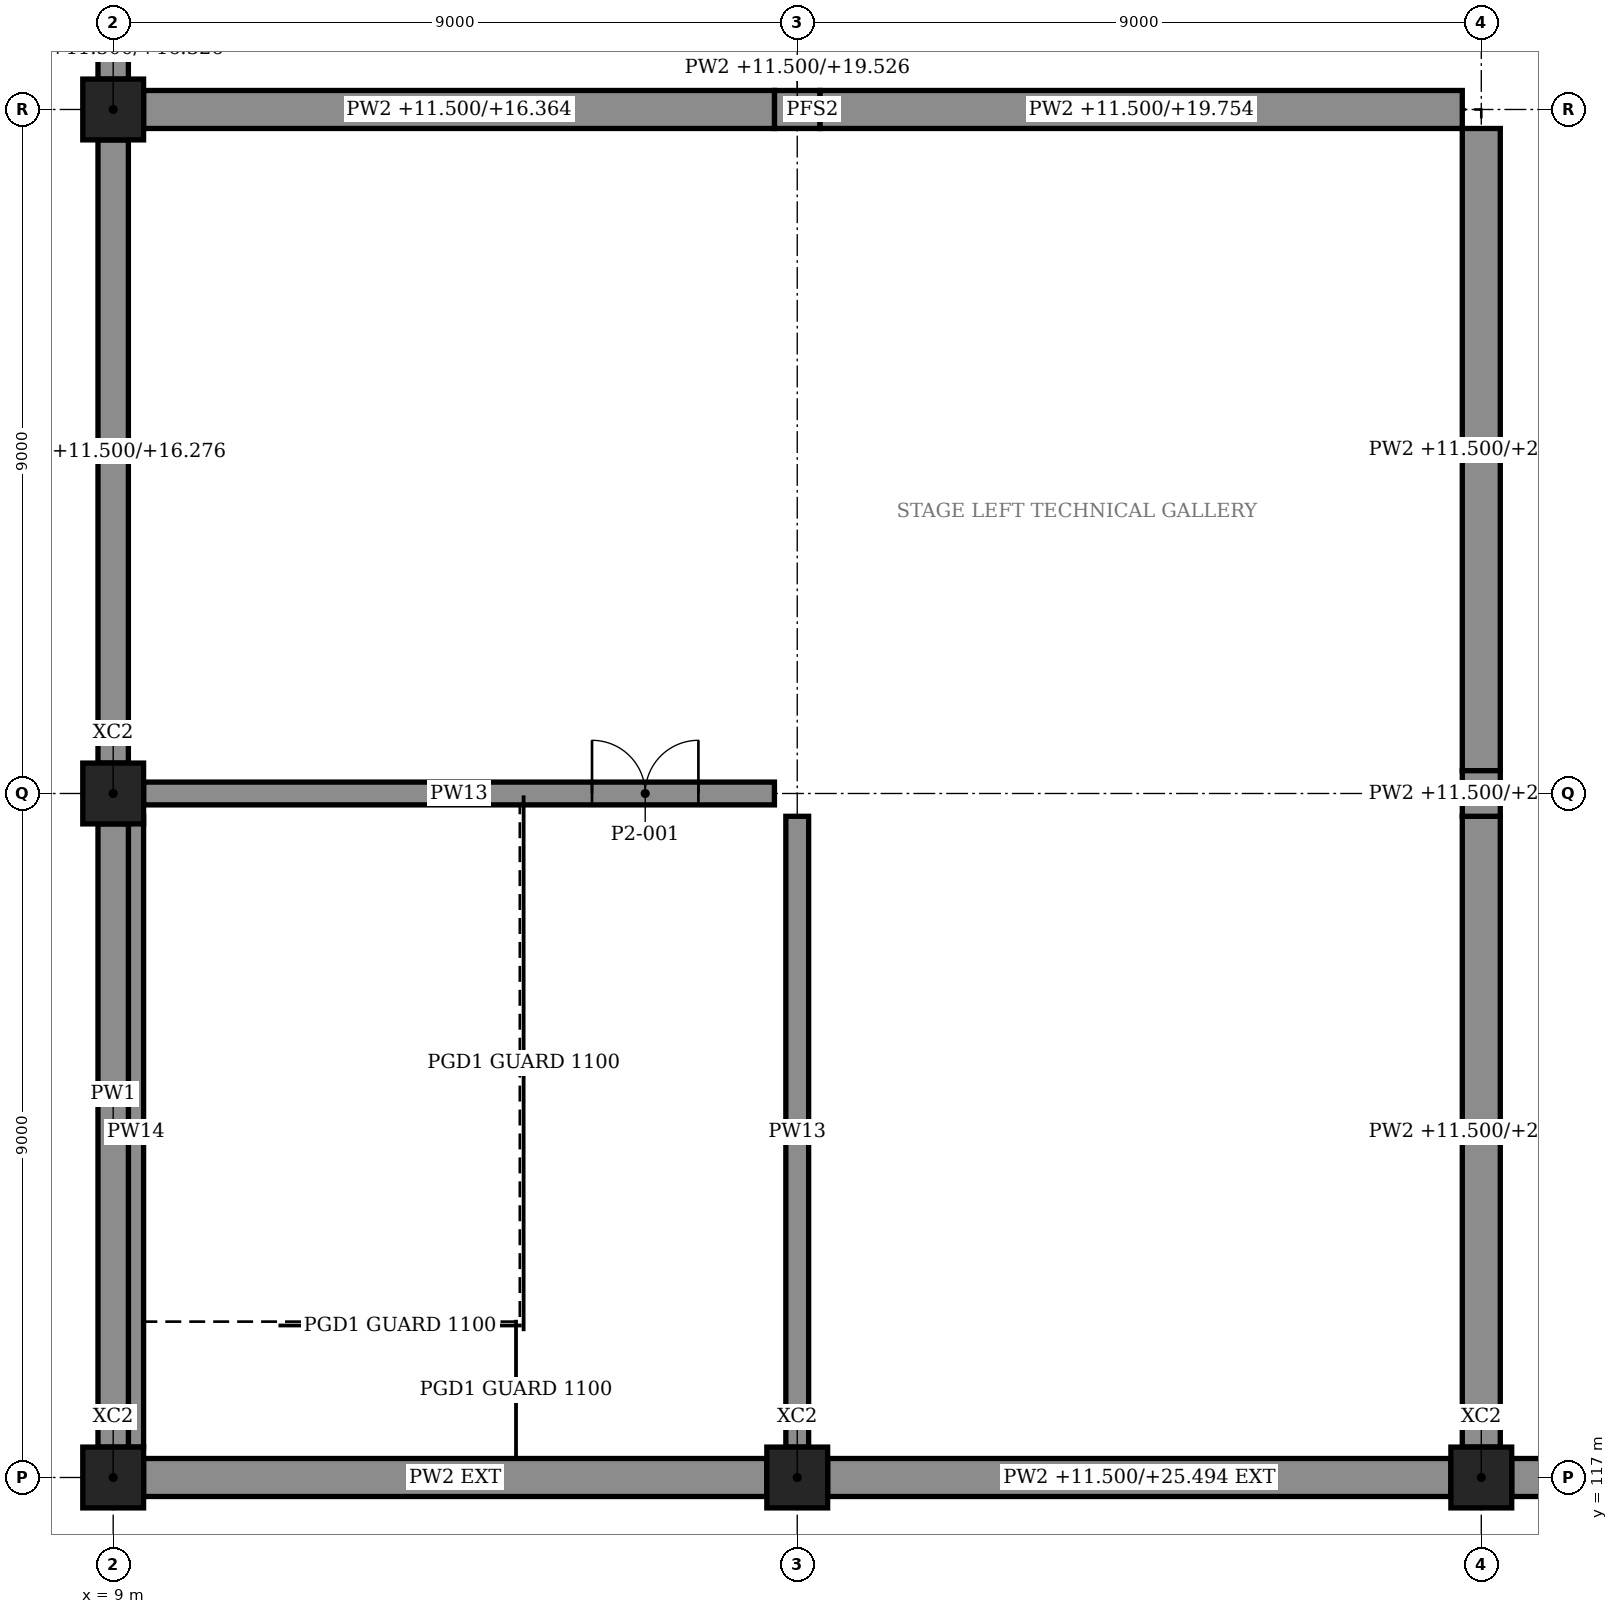
"""IFC4 building model, lengths in metres.
Left out: names, types, materials, properties, quantities, classifications, styles, units other than length and angle.
Written with IfcOpenShell. Run it as: python <this file> out.ifc"""

import sys

from ifc_helpers import new_model, si_unit, direction, frame, frame_2d, origin, origin_2d, place, context, subcontext, project, spatial, polyline, rectangle, outline, extrude, element, fill, save


model = new_model("IFC4")
c1 = context("Model", 3, precision=1e-05, world=origin(), true_north=direction((0.0, 1.0)))
c2 = subcontext(c1, "Body", "Model", "MODEL_VIEW")
j1 = project(units=[si_unit("LENGTHUNIT", "METRE"), si_unit("PLANEANGLEUNIT", "RADIAN")], contexts=[c1])
p1 = place(None, origin())
s1 = spatial("IfcSite", under=j1, at=p1, CompositionType="ELEMENT")
p2 = place(p1, origin())
s2 = spatial("IfcBuilding", under=s1, at=p2, CompositionType="ELEMENT")
p3 = place(p2, frame((0.0, 0.0, 11.5)))
s3 = spatial("IfcBuildingStorey", under=s2, at=p3, CompositionType="ELEMENT", Elevation=11.5)
for number, where, z_axis, x_axis in (
    (1, (9.0, 117.0, 0.0), (0.0, 0.0, 1.0), (1.0, 0.0, 0.0)),
    (2, (18.0, 117.0, 0.0), (0.0, 0.0, 1.0), (1.0, 0.0, 0.0)),
    (3, (27.0, 117.0, 0.0), (0.0, 0.0, 1.0), (1.0, 0.0, 0.0)),
    (4, (9.0, 126.0, 0.0), (0.0, 0.0, 1.0), (1.0, 0.0, 0.0)),
):
    element("IfcColumn", number, at=place(p3, frame(where, z_axis=z_axis, x_axis=x_axis)), inside=s3, PredefinedType="COLUMN", context=c2, shape_type="SweptSolid", body=[
        extrude(rectangle(XDim=0.8, YDim=0.8, at=origin_2d()), origin(), (0.0, 0.0, 1.0), 5.5),
    ])
p4 = place(p3, frame((9.0, 135.0, 0.0), z_axis=(0.0, 0.0, 1.0), x_axis=(1.0, 0.0, 0.0)))
e5 = element("IfcColumn", 5, at=p4, inside=s3, PredefinedType="COLUMN", context=c2, shape_type="SweptSolid", body=[
    extrude(rectangle(XDim=0.8, YDim=0.8, at=origin_2d()), origin(), (0.0, 0.0, 1.0), 4.826),
])
p5 = place(p3, frame((9.0, 117.4, 0.0), z_axis=(0.0, 0.0, 1.0), x_axis=(0.0, 1.0, 0.0)))
e6 = element("IfcWall", 6, at=p5, inside=s3, PredefinedType="SOLIDWALL", context=c2, shape_type="SweptSolid", body=[
    extrude(outline(polyline([(0.0, 0.0), (8.2, 0.0), (8.2, 7.061), (0.0, 10.313), (0.0, 0.0)])), frame((0.0, 0.2, 0.0), z_axis=(0.0, -1.0, 0.0), x_axis=(1.0, 0.0, 0.0)), (0.0, 0.0, 1.0), 0.4),
])
p6 = place(p3, frame((9.0, 126.4, 0.0), z_axis=(0.0, 0.0, 1.0), x_axis=(0.0, 1.0, 0.0)))
e7 = element("IfcWall", 7, at=p6, inside=s3, PredefinedType="SOLIDWALL", context=c2, shape_type="SweptSolid", body=[
    extrude(outline(polyline([(0.0, 0.0), (8.2, 0.0), (8.2, 4.776), (0.0, 6.936), (0.0, 0.0)])), frame((0.0, 0.2, 0.0), z_axis=(0.0, -1.0, 0.0), x_axis=(1.0, 0.0, 0.0)), (0.0, 0.0, 1.0), 0.4),
])
p7 = place(p3, frame((9.0, 135.4, 0.0), z_axis=(0.0, 0.0, 1.0), x_axis=(0.0, 1.0, 0.0)))
e8 = element("IfcWall", 8, at=p7, inside=s3, PredefinedType="SOLIDWALL", context=c2, shape_type="SweptSolid", body=[
    extrude(outline(polyline([(0.0, 0.0), (8.2, 0.0), (8.2, 3.633), (0.0, 4.701), (0.0, 0.0)])), frame((0.0, 0.2, 0.0), z_axis=(0.0, -1.0, 0.0), x_axis=(1.0, 0.0, 0.0)), (0.0, 0.0, 1.0), 0.4),
])
p8 = place(p3, frame((9.4, 117.0, 0.0), z_axis=(0.0, 0.0, 1.0), x_axis=(1.0, 0.0, 0.0)))
e9 = element("IfcWall", 9, at=p8, inside=s3, PredefinedType="SOLIDWALL", context=c2, shape_type="SweptSolid", body=[
    extrude(outline(polyline([(0.0, 0.0), (8.2, 0.0), (8.2, 13.816), (0.0, 10.578), (0.0, 0.0)])), frame((0.0, 0.25, 0.0), z_axis=(0.0, -1.0, 0.0), x_axis=(1.0, 0.0, 0.0)), (0.0, 0.0, 1.0), 0.5),
])
p9 = place(p3, frame((18.4, 117.0, 0.0), z_axis=(0.0, 0.0, 1.0), x_axis=(1.0, 0.0, 0.0)))
e10 = element("IfcWall", 10, at=p9, inside=s3, PredefinedType="SOLIDWALL", context=c2, shape_type="SweptSolid", body=[
    extrude(outline(polyline([(0.0, 0.0), (8.2, 0.0), (8.2, 16.153), (0.0, 13.994), (0.0, 0.0)])), frame((0.0, 0.25, 0.0), z_axis=(0.0, -1.0, 0.0), x_axis=(1.0, 0.0, 0.0)), (0.0, 0.0, 1.0), 0.5),
])
p10 = place(p3, frame((27.4, 117.0, 0.0), z_axis=(0.0, 0.0, 1.0), x_axis=(1.0, 0.0, 0.0)))
e11 = element("IfcWall", 11, at=p10, inside=s3, PredefinedType="SOLIDWALL", context=c2, shape_type="SweptSolid", body=[
    extrude(outline(polyline([(0.0, 0.0), (8.2, 0.0), (8.2, 17.346), (0.0, 16.267), (0.0, 0.0)])), frame((0.0, 0.25, 0.0), z_axis=(0.0, -1.0, 0.0), x_axis=(1.0, 0.0, 0.0)), (0.0, 0.0, 1.0), 0.5),
])
p11 = place(p3, frame((9.4, 135.0, 0.0), z_axis=(0.0, 0.0, 1.0), x_axis=(1.0, 0.0, 0.0)))
e12 = element("IfcWall", 12, at=p11, inside=s3, PredefinedType="SOLIDWALL", context=c2, shape_type="SweptSolid", body=[
    extrude(outline(polyline([(0.0, 0.0), (8.3, 0.0), (8.3, 8.14), (0.0, 4.864), (0.0, 0.0)])), frame((0.0, 0.25, 0.0), z_axis=(0.0, -1.0, 0.0), x_axis=(1.0, 0.0, 0.0)), (0.0, 0.0, 1.0), 0.5),
])
p12 = place(p3, frame((18.3, 135.0, 0.0), z_axis=(0.0, 0.0, 1.0), x_axis=(1.0, 0.0, 0.0)))
e13 = element("IfcWall", 13, at=p12, inside=s3, PredefinedType="SOLIDWALL", context=c2, shape_type="SweptSolid", body=[
    extrude(outline(polyline([(0.0, 0.0), (8.45, 0.0), (8.45, 10.477), (0.0, 8.254), (0.0, 0.0)])), frame((0.0, 0.25, 0.0), z_axis=(0.0, -1.0, 0.0), x_axis=(1.0, 0.0, 0.0)), (0.0, 0.0, 1.0), 0.5),
])
p13 = place(p3, frame((27.0, 117.4, 0.0), z_axis=(0.0, 0.0, 1.0), x_axis=(0.0, 1.0, 0.0)))
e14 = element("IfcWall", 14, at=p13, inside=s3, PredefinedType="SOLIDWALL", context=c2, shape_type="SweptSolid", body=[
    extrude(outline(polyline([(0.0, 0.0), (8.3, 0.0), (8.3, 12.922), (0.0, 16.078), (0.0, 0.0)])), frame((0.0, 0.25, 0.0), z_axis=(0.0, -1.0, 0.0), x_axis=(1.0, 0.0, 0.0)), (0.0, 0.0, 1.0), 0.5),
])
p14 = place(p3, frame((27.0, 126.3, 0.0), z_axis=(0.0, 0.0, 1.0), x_axis=(0.0, 1.0, 0.0)))
e15 = element("IfcWall", 15, at=p14, inside=s3, PredefinedType="SOLIDWALL", context=c2, shape_type="SweptSolid", body=[
    extrude(outline(polyline([(0.0, 0.0), (8.45, 0.0), (8.45, 10.588), (0.0, 12.731), (0.0, 0.0)])), frame((0.0, 0.25, 0.0), z_axis=(0.0, -1.0, 0.0), x_axis=(1.0, 0.0, 0.0)), (0.0, 0.0, 1.0), 0.5),
])
p15 = place(p3, frame((27.0, 125.7, 0.0), z_axis=(0.0, 0.0, 1.0), x_axis=(0.0, 1.0, 0.0)))
e16 = element("IfcWall", 16, at=p15, inside=s3, PredefinedType="SOLIDWALL", context=c2, shape_type="SweptSolid", body=[
    extrude(outline(polyline([(0.0, 0.0), (0.6, 0.0), (0.6, 12.731), (0.0, 12.922), (0.0, 0.0)])), frame((0.0, 0.25, 0.0), z_axis=(0.0, -1.0, 0.0), x_axis=(1.0, 0.0, 0.0)), (0.0, 0.0, 1.0), 0.5),
])
p16 = place(p3, frame((17.7, 135.0, 0.0), z_axis=(0.0, 0.0, 1.0), x_axis=(1.0, 0.0, 0.0)))
e17 = element("IfcWall", 17, at=p16, inside=s3, PredefinedType="SOLIDWALL", context=c2, shape_type="SweptSolid", body=[
    extrude(outline(polyline([(0.0, 0.0), (0.6, 0.0), (0.6, 8.331), (0.3, 8.254), (0.0, 8.026), (0.0, 0.0)])), frame((0.0, 0.25, 0.0), z_axis=(0.0, -1.0, 0.0), x_axis=(1.0, 0.0, 0.0)), (0.0, 0.0, 1.0), 0.5),
])
p17 = place(p3, frame((18.0, 117.4, 0.0), z_axis=(0.0, 0.0, 1.0), x_axis=(0.0, 1.0, 0.0)))
e18 = element("IfcWall", 18, at=p17, inside=s3, PredefinedType="SOLIDWALL", context=c2, shape_type="SweptSolid", body=[
    extrude(rectangle(XDim=8.3, YDim=0.3, at=frame_2d((4.15, 0.0))), origin(), (0.0, 0.0, 1.0), 2.5),
])
p18 = place(p3, frame((9.4, 126.0, 0.0), z_axis=(0.0, 0.0, 1.0), x_axis=(1.0, 0.0, 0.0)))
e19 = element("IfcWall", 19, at=p18, inside=s3, PredefinedType="SOLIDWALL", context=c2, shape_type="SweptSolid", body=[
    extrude(rectangle(XDim=8.3, YDim=0.3, at=frame_2d((4.15, 0.0))), origin(), (0.0, 0.0, 1.0), 2.5),
])
p19 = place(p18, frame((5.9, 0.0, 0.0)))
e20 = element("IfcOpeningElement", 20, at=p19, cuts=e19, PredefinedType="OPENING", context=c2, shape_type="SweptSolid", body=[
    extrude(rectangle(XDim=1.4, YDim=2.4, at=frame_2d((0.7, 1.2))), frame((0.0, 0.16, 0.0), z_axis=(0.0, -1.0, 0.0), x_axis=(1.0, 0.0, 0.0)), (0.0, 0.0, 1.0), 0.32),
])
p20 = place(p3, frame((9.3, 117.4, 0.0), z_axis=(0.0, 0.0, 1.0), x_axis=(0.0, 1.0, 0.0)))
e21 = element("IfcWall", 21, at=p20, inside=s3, PredefinedType="SOLIDWALL", context=c2, shape_type="SweptSolid", body=[
    extrude(rectangle(XDim=8.3, YDim=0.2, at=frame_2d((4.15, 0.0))), origin(), (0.0, 0.0, 1.0), 2.5),
])
p21 = place(p19, origin())
e22 = element("IfcDoor", 22, at=p21, inside=s3, OperationType="SINGLE_SWING_LEFT", PredefinedType="DOOR", context=c2, shape_type="SweptSolid", body=[
    extrude(rectangle(XDim=1.4, YDim=2.4, at=frame_2d((0.7, 1.2))), frame((0.0, 0.025, 0.0), z_axis=(0.0, -1.0, 0.0), x_axis=(1.0, 0.0, 0.0)), (0.0, 0.0, 1.0), 0.05),
])
fill(e20, e22)
save(model, sys.argv[1])
